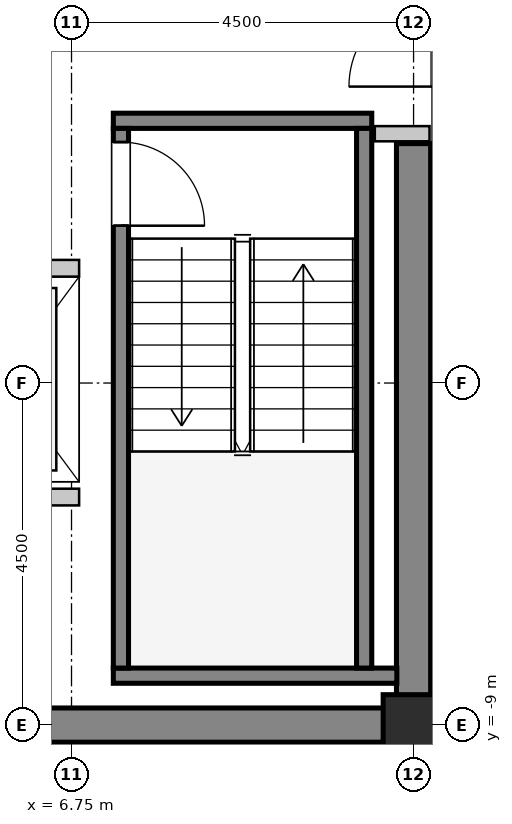
"""IFC4 building model, lengths in metres.
Left out: names, types, materials, properties, quantities, classifications, styles, units other than length and angle.
Written with IfcOpenShell. Run it as: python <this file> out.ifc"""

import sys

from ifc_helpers import new_model, si_unit, direction, frame, frame_2d, origin, origin_2d, place, context, subcontext, project, spatial, rectangle, hollow_rectangle, extrude, source, transform, mapped, element, fill, save


model = new_model("IFC4")
c1 = context("Model", 3, precision=1e-05, world=origin(), true_north=direction((0.0, 1.0)))
c2 = subcontext(c1, "Body", "Model", "MODEL_VIEW")
j1 = project(units=[si_unit("LENGTHUNIT", "METRE"), si_unit("PLANEANGLEUNIT", "RADIAN")], contexts=[c1])
p1 = place(None, origin())
s1 = spatial("IfcSite", under=j1, at=p1, CompositionType="ELEMENT")
p2 = place(p1, origin())
s2 = spatial("IfcBuilding", under=s1, at=p2, CompositionType="ELEMENT")
p3 = place(p2, frame((0.0, 0.0, 214.2)))
s3 = spatial("IfcBuildingStorey", under=s2, at=p3, CompositionType="ELEMENT", Elevation=214.2)
m1 = source(origin(), c2, "Body", "SweptSolid", [
    extrude(rectangle(XDim=9.925, YDim=0.45, at=frame_2d((4.962, 0.0))), origin(), (0.0, 0.0, 1.0), 3.8),
])
p4 = place(p3, frame((1.55, -9.0, 0.0), z_axis=(0.0, 0.0, 1.0), x_axis=(1.0, 0.0, 0.0)))
e1 = element("IfcWall", 1, at=p4, inside=s3, PredefinedType="SHEAR", context=c2, shape_type="MappedRepresentation", body=[
    mapped(m1, transform((0.0, 0.0, 0.0), x_axis=(1.0, 0.0, 0.0), y_axis=(0.0, 1.0, 0.0), z_axis=(0.0, 0.0, 1.0), scale=1.0)),
])
m2 = source(origin(), c2, "Body", "SweptSolid", [
    extrude(rectangle(XDim=7.425, YDim=0.45, at=frame_2d((3.712, 0.0))), origin(), (0.0, 0.0, 1.0), 3.8),
])
p5 = place(p3, frame((11.25, -8.775, 0.0), z_axis=(0.0, 0.0, 1.0), x_axis=(0.0, 1.0, 0.0)))
e2 = element("IfcWall", 2, at=p5, inside=s3, PredefinedType="SHEAR", context=c2, shape_type="MappedRepresentation", body=[
    mapped(m2, transform((0.0, 0.0, 0.0), x_axis=(1.0, 0.0, 0.0), y_axis=(0.0, 1.0, 0.0), z_axis=(0.0, 0.0, 1.0), scale=1.0)),
])
m3 = source(origin(), c2, "Body", "SweptSolid", [
    extrude(hollow_rectangle(XDim=0.8, YDim=0.8, WallThickness=0.04, InnerFilletRadius=0.04, OuterFilletRadius=0.08, at=origin_2d()), origin(), (0.0, 0.0, 1.0), 3.8),
])
p6 = place(p3, frame((11.25, -9.0, 0.0), z_axis=(0.0, 0.0, 1.0), x_axis=(1.0, 0.0, 0.0)))
e3 = element("IfcColumn", 3, at=p6, inside=s3, PredefinedType="COLUMN", context=c2, shape_type="MappedRepresentation", body=[
    mapped(m3, transform((0.0, 0.0, 0.0), x_axis=(1.0, 0.0, 0.0), y_axis=(0.0, 1.0, 0.0), z_axis=(0.0, 0.0, 1.0), scale=1.0)),
])
m4 = source(origin(), c2, "Body", "SweptSolid", [
    extrude(rectangle(XDim=3.4, YDim=0.2, at=frame_2d((1.7, 0.0))), origin(), (0.0, 0.0, 1.0), 3.8),
])
p7 = place(p3, frame((7.3, -1.05, 0.0), z_axis=(0.0, 0.0, 1.0), x_axis=(1.0, 0.0, 0.0)))
e4 = element("IfcWall", 4, at=p7, inside=s3, PredefinedType="SOLIDWALL", context=c2, shape_type="MappedRepresentation", body=[
    mapped(m4, transform((0.0, 0.0, 0.0), x_axis=(1.0, 0.0, 0.0), y_axis=(0.0, 1.0, 0.0), z_axis=(0.0, 0.0, 1.0), scale=1.0)),
])
m5 = source(origin(), c2, "Body", "SweptSolid", [
    extrude(rectangle(XDim=3.73, YDim=0.2, at=frame_2d((1.865, 0.0))), origin(), (0.0, 0.0, 1.0), 3.8),
])
p8 = place(p3, frame((7.3, -8.35, 0.0), z_axis=(0.0, 0.0, 1.0), x_axis=(1.0, 0.0, 0.0)))
e5 = element("IfcWall", 5, at=p8, inside=s3, PredefinedType="SOLIDWALL", context=c2, shape_type="MappedRepresentation", body=[
    mapped(m5, transform((0.0, 0.0, 0.0), x_axis=(1.0, 0.0, 0.0), y_axis=(0.0, 1.0, 0.0), z_axis=(0.0, 0.0, 1.0), scale=1.0)),
])
m6 = source(origin(), c2, "Body", "SweptSolid", [
    extrude(rectangle(XDim=7.1, YDim=0.2, at=frame_2d((3.55, 0.0))), origin(), (0.0, 0.0, 1.0), 3.8),
])
p9 = place(p3, frame((7.4, -1.15, 0.0), z_axis=(0.0, 0.0, 1.0), x_axis=(0.0, -1.0, 0.0)))
e6 = element("IfcWall", 6, at=p9, inside=s3, PredefinedType="SOLIDWALL", context=c2, shape_type="MappedRepresentation", body=[
    mapped(m6, transform((0.0, 0.0, 0.0), x_axis=(1.0, 0.0, 0.0), y_axis=(0.0, 1.0, 0.0), z_axis=(0.0, 0.0, 1.0), scale=1.0)),
])
p10 = place(p9, frame((0.18, 0.0, 0.0)))
e7 = element("IfcOpeningElement", 7, at=p10, cuts=e6, PredefinedType="OPENING", context=c2, shape_type="SweptSolid", body=[
    extrude(rectangle(XDim=1.1, YDim=2.15, at=frame_2d((0.55, 1.075))), frame((0.0, 0.11, 0.0), z_axis=(0.0, -1.0, 0.0), x_axis=(1.0, 0.0, 0.0)), (0.0, 0.0, 1.0), 0.22),
])
p11 = place(p3, frame((10.6, -1.15, 0.0), z_axis=(0.0, 0.0, 1.0), x_axis=(0.0, -1.0, 0.0)))
e8 = element("IfcWall", 8, at=p11, inside=s3, PredefinedType="SOLIDWALL", context=c2, shape_type="MappedRepresentation", body=[
    mapped(m6, transform((0.0, 0.0, 0.0), x_axis=(1.0, 0.0, 0.0), y_axis=(0.0, 1.0, 0.0), z_axis=(0.0, 0.0, 1.0), scale=1.0)),
])
m7 = source(origin(), c2, "Body", "SweptSolid", [
    extrude(rectangle(XDim=2.0, YDim=0.22, at=frame_2d((1.0, 0.0))), origin(), (0.0, 0.0, 1.0), 3.535),
])
p12 = place(p3, frame((6.85, -2.99, 0.0), z_axis=(0.0, 0.0, 1.0), x_axis=(-1.0, 0.0, 0.0)))
e9 = element("IfcWall", 9, at=p12, inside=s3, PredefinedType="SOLIDWALL", context=c2, shape_type="MappedRepresentation", body=[
    mapped(m7, transform((0.0, 0.0, 0.0), x_axis=(1.0, 0.0, 0.0), y_axis=(0.0, 1.0, 0.0), z_axis=(0.0, 0.0, 1.0), scale=1.0)),
])
p13 = place(p12, frame((0.4, 0.0, 0.0)))
e10 = element("IfcOpeningElement", 10, at=p13, cuts=e9, PredefinedType="OPENING", context=c2, shape_type="SweptSolid", body=[
    extrude(rectangle(XDim=1.2, YDim=2.2, at=frame_2d((0.6, 1.1))), frame((0.0, 0.12, 0.0), z_axis=(0.0, -1.0, 0.0), x_axis=(1.0, 0.0, 0.0)), (0.0, 0.0, 1.0), 0.24),
])
m8 = source(origin(), c2, "Body", "SweptSolid", [
    extrude(rectangle(XDim=2.095, YDim=0.22, at=frame_2d((1.048, 0.0))), origin(), (0.0, 0.0, 1.0), 3.535),
])
p14 = place(p3, frame((4.755, -6.0, 0.0), z_axis=(0.0, 0.0, 1.0), x_axis=(1.0, 0.0, 0.0)))
e11 = element("IfcWall", 11, at=p14, inside=s3, PredefinedType="SOLIDWALL", context=c2, shape_type="MappedRepresentation", body=[
    mapped(m8, transform((0.0, 0.0, 0.0), x_axis=(1.0, 0.0, 0.0), y_axis=(0.0, 1.0, 0.0), z_axis=(0.0, 0.0, 1.0), scale=1.0)),
])
m9 = source(origin(), c2, "Body", "SweptSolid", [
    extrude(rectangle(XDim=0.72, YDim=0.2, at=frame_2d((0.36, 0.0))), origin(), (0.0, 0.0, 1.0), 3.535),
])
p15 = place(p3, frame((10.74, -1.22, 0.0), z_axis=(0.0, 0.0, 1.0), x_axis=(1.0, 0.0, 0.0)))
e12 = element("IfcWall", 12, at=p15, inside=s3, PredefinedType="PARTITIONING", context=c2, shape_type="MappedRepresentation", body=[
    mapped(m9, transform((0.0, 0.0, 0.0), x_axis=(1.0, 0.0, 0.0), y_axis=(0.0, 1.0, 0.0), z_axis=(0.0, 0.0, 1.0), scale=1.0)),
])
m10 = source(origin(), c2, "Body", "SweptSolid", [
    extrude(rectangle(XDim=1.1, YDim=2.15, at=frame_2d((0.55, 1.075))), frame((0.0, 0.025, 0.0), z_axis=(0.0, -1.0, 0.0), x_axis=(1.0, 0.0, 0.0)), (0.0, 0.0, 1.0), 0.05),
])
p16 = place(p10, origin())
e13 = element("IfcDoor", 13, at=p16, inside=s3, OperationType="SINGLE_SWING_RIGHT", PredefinedType="DOOR", context=c2, shape_type="MappedRepresentation", body=[
    mapped(m10, transform((0.0, 0.0, 0.0), x_axis=(1.0, 0.0, 0.0), y_axis=(0.0, 1.0, 0.0), z_axis=(0.0, 0.0, 1.0), scale=1.0)),
])
fill(e7, e13)
save(model, sys.argv[1])
